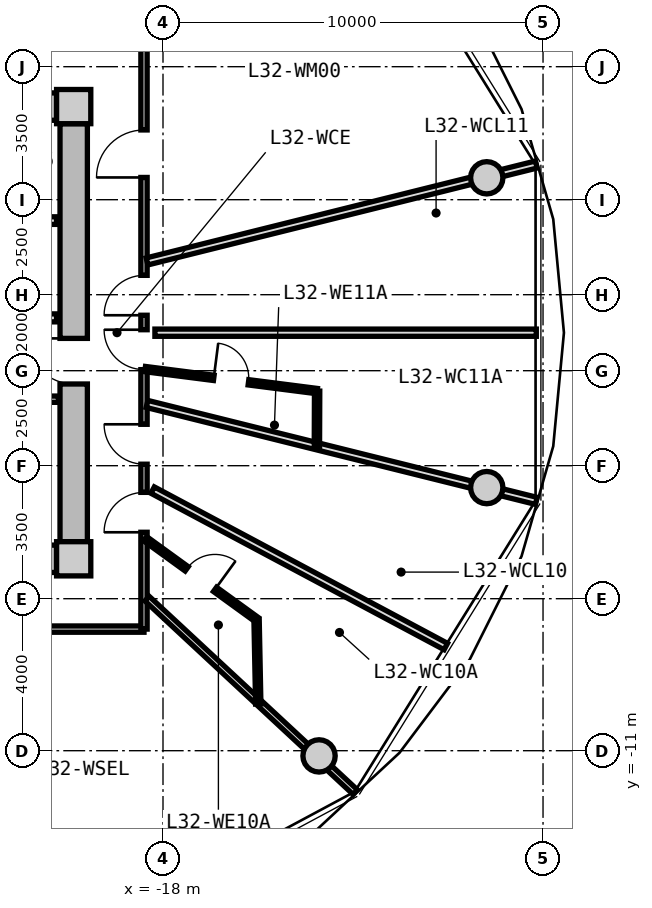
"""IFC4 building model, lengths in metres.
Left out: names, types, materials, properties, quantities, classifications, styles, units other than length and angle.
Written with IfcOpenShell. Run it as: python <this file> out.ifc"""

import sys

from ifc_helpers import new_model, si_unit, direction, frame, frame_2d, origin, origin_2d, place, context, subcontext, project, spatial, rectangle, circle, extrude, source, transform, mapped, element, fill, save


model = new_model("IFC4")
c1 = context("Model", 3, precision=1e-05, world=origin(), true_north=direction((0.0, 1.0)))
c2 = subcontext(c1, "Body", "Model", "MODEL_VIEW")
j1 = project(units=[si_unit("LENGTHUNIT", "METRE"), si_unit("PLANEANGLEUNIT", "RADIAN")], contexts=[c1])
p1 = place(None, origin())
s1 = spatial("IfcSite", under=j1, at=p1, CompositionType="ELEMENT")
p2 = place(p1, origin())
s2 = spatial("IfcBuilding", under=s1, at=p2, CompositionType="ELEMENT")
p3 = place(p2, frame((0.0, 0.0, 105.4)))
s3 = spatial("IfcBuildingStorey", under=s2, at=p3, CompositionType="ELEMENT", Elevation=105.4)
m1 = source(origin(), c2, "Body", "SweptSolid", [
    extrude(rectangle(XDim=0.9, YDim=0.9, at=origin_2d()), origin(), (0.0, 0.0, 1.0), 3.05),
])
for number, where, z_axis, x_axis in (
    (1, (-20.35, -5.95, 0.0), (0.0, 0.0, 1.0), (1.0, 0.0, 0.0)),
    (2, (-20.35, 5.95, 0.0), (0.0, 0.0, 1.0), (1.0, 0.0, 0.0)),
):
    element("IfcColumn", number, at=place(p3, frame(where, z_axis=z_axis, x_axis=x_axis)), inside=s3, PredefinedType="COLUMN", context=c2, shape_type="MappedRepresentation", body=[
        mapped(m1, transform((0.0, 0.0, 0.0), x_axis=(1.0, 0.0, 0.0), y_axis=(0.0, 1.0, 0.0), z_axis=(0.0, 0.0, 1.0), scale=1.0)),
    ])
m2 = source(origin(), c2, "Body", "SweptSolid", [
    extrude(rectangle(XDim=14.4, YDim=0.72, at=frame_2d((7.2, 0.0))), origin(), (0.0, 0.0, 1.0), 2.79),
])
for number, where, z_axis, x_axis in (
    (3, (-35.2, 5.95, 0.0), (0.0, 0.0, 1.0), (1.0, 0.0, 0.0)),
    (4, (-20.8, -5.95, 0.0), (0.0, 0.0, 1.0), (-1.0, 0.0, 0.0)),
):
    element("IfcWall", number, at=place(p3, frame(where, z_axis=z_axis, x_axis=x_axis)), inside=s3, PredefinedType="SHEAR", context=c2, shape_type="MappedRepresentation", body=[
        mapped(m2, transform((0.0, 0.0, 0.0), x_axis=(1.0, 0.0, 0.0), y_axis=(0.0, 1.0, 0.0), z_axis=(0.0, 0.0, 1.0), scale=1.0)),
    ])
m3 = source(origin(), c2, "Body", "SweptSolid", [
    extrude(rectangle(XDim=11.0, YDim=0.72, at=frame_2d((5.5, 0.0))), origin(), (0.0, 0.0, 1.0), 2.79),
])
p4 = place(p3, frame((-20.35, 5.5, 0.0), z_axis=(0.0, 0.0, 1.0), x_axis=(0.0, -1.0, 0.0)))
e5 = element("IfcWall", 5, at=p4, inside=s3, PredefinedType="SHEAR", context=c2, shape_type="MappedRepresentation", body=[
    mapped(m3, transform((0.0, 0.0, 0.0), x_axis=(1.0, 0.0, 0.0), y_axis=(0.0, 1.0, 0.0), z_axis=(0.0, 0.0, 1.0), scale=1.0)),
])
p5 = place(p4, frame((5.65, 0.0, 0.0)))
e6 = element("IfcOpeningElement", 6, at=p5, cuts=e5, PredefinedType="OPENING", context=c2, shape_type="SweptSolid", body=[
    extrude(rectangle(XDim=1.2, YDim=2.15, at=frame_2d((0.6, 1.075))), frame((0.0, 0.37, 0.0), z_axis=(0.0, -1.0, 0.0), x_axis=(1.0, 0.0, 0.0)), (0.0, 0.0, 1.0), 0.74),
])
m4 = source(origin(), c2, "Body", "SweptSolid", [
    extrude(circle(Radius=0.425, at=origin_2d()), origin(), (0.0, 0.0, 1.0), 3.05),
])
for number, where, z_axis, x_axis in (
    (7, (-9.481, 4.076, 0.0), (0.0, 0.0, 1.0), (1.0, 0.0, 0.0)),
    (8, (-13.894, -11.137, 0.0), (0.0, 0.0, 1.0), (1.0, 0.0, 0.0)),
    (9, (-9.481, -4.076, 0.0), (0.0, 0.0, 1.0), (1.0, 0.0, 0.0)),
):
    element("IfcColumn", number, at=place(p3, frame(where, z_axis=z_axis, x_axis=x_axis)), inside=s3, PredefinedType="COLUMN", context=c2, shape_type="MappedRepresentation", body=[
        mapped(m4, transform((0.0, 0.0, 0.0), x_axis=(1.0, 0.0, 0.0), y_axis=(0.0, 1.0, 0.0), z_axis=(0.0, 0.0, 1.0), scale=1.0)),
    ])
m5 = source(origin(), c2, "Body", "SweptSolid", [
    extrude(rectangle(XDim=3.2, YDim=0.2, at=frame_2d((1.6, 0.0))), origin(), (0.0, 0.0, 1.0), 2.775),
])
p6 = place(p3, frame((-24.0, 2.95, 0.0), z_axis=(0.0, 0.0, 1.0), x_axis=(1.0, 0.0, 0.0)))
e10 = element("IfcWall", 10, at=p6, inside=s3, PredefinedType="PARTITIONING", context=c2, shape_type="MappedRepresentation", body=[
    mapped(m5, transform((0.0, 0.0, 0.0), x_axis=(1.0, 0.0, 0.0), y_axis=(0.0, 1.0, 0.0), z_axis=(0.0, 0.0, 1.0), scale=1.0)),
])
m6 = source(origin(), c2, "Body", "SweptSolid", [
    extrude(rectangle(XDim=6.66, YDim=0.21, at=frame_2d((3.33, 0.0))), origin(), (0.0, 0.0, 1.0), 2.775),
])
p7 = place(p3, frame((-27.46, 0.39, 0.0), z_axis=(0.0, 0.0, 1.0), x_axis=(1.0, 0.0, 0.0)))
e11 = element("IfcWall", 11, at=p7, inside=s3, PredefinedType="PARTITIONING", context=c2, shape_type="MappedRepresentation", body=[
    mapped(m6, transform((0.0, 0.0, 0.0), x_axis=(1.0, 0.0, 0.0), y_axis=(0.0, 1.0, 0.0), z_axis=(0.0, 0.0, 1.0), scale=1.0)),
])
p8 = place(p7, frame((1.0, 0.0, 0.0)))
e12 = element("IfcOpeningElement", 12, at=p8, cuts=e11, PredefinedType="OPENING", context=c2, shape_type="SweptSolid", body=[
    extrude(rectangle(XDim=1.2, YDim=2.15, at=frame_2d((0.6, 1.075))), frame((0.0, 0.115, 0.0), z_axis=(0.0, -1.0, 0.0), x_axis=(1.0, 0.0, 0.0)), (0.0, 0.0, 1.0), 0.23),
])
m7 = source(origin(), c2, "Body", "SweptSolid", [
    extrude(rectangle(XDim=2.7, YDim=0.165, at=frame_2d((1.35, 0.0))), origin(), (0.0, 0.0, 1.0), 2.775),
])
p9 = place(p3, frame((-23.45, -1.75, 0.0), z_axis=(0.0, 0.0, 1.0), x_axis=(1.0, 0.0, 0.0)))
e13 = element("IfcWall", 13, at=p9, inside=s3, PredefinedType="PARTITIONING", context=c2, shape_type="MappedRepresentation", body=[
    mapped(m7, transform((0.0, 0.0, 0.0), x_axis=(1.0, 0.0, 0.0), y_axis=(0.0, 1.0, 0.0), z_axis=(0.0, 0.0, 1.0), scale=1.0)),
])
p10 = place(p9, frame((0.222, 0.0, 0.0)))
e14 = element("IfcOpeningElement", 14, at=p10, cuts=e13, PredefinedType="OPENING", context=c2, shape_type="SweptSolid", body=[
    extrude(rectangle(XDim=0.925, YDim=2.1, at=frame_2d((0.462, 1.05))), frame((0.0, 0.093, 0.0), z_axis=(0.0, -1.0, 0.0), x_axis=(1.0, 0.0, 0.0)), (0.0, 0.0, 1.0), 0.185),
])
p11 = place(p9, frame((1.522, 0.0, 0.0)))
e15 = element("IfcOpeningElement", 15, at=p11, cuts=e13, PredefinedType="OPENING", context=c2, shape_type="SweptSolid", body=[
    extrude(rectangle(XDim=0.925, YDim=2.1, at=frame_2d((0.462, 1.05))), frame((0.0, 0.093, 0.0), z_axis=(0.0, -1.0, 0.0), x_axis=(1.0, 0.0, 0.0)), (0.0, 0.0, 1.0), 0.185),
])
m8 = source(origin(), c2, "Body", "SweptSolid", [
    extrude(rectangle(XDim=8.6, YDim=0.165, at=frame_2d((4.3, 0.0))), origin(), (0.0, 0.0, 1.0), 2.775),
])
p12 = place(p3, frame((-18.5, -7.8, 0.0), z_axis=(0.0, 0.0, 1.0), x_axis=(-1.0, 0.0, 0.0)))
e16 = element("IfcWall", 16, at=p12, inside=s3, PredefinedType="PARTITIONING", context=c2, shape_type="MappedRepresentation", body=[
    mapped(m8, transform((0.0, 0.0, 0.0), x_axis=(1.0, 0.0, 0.0), y_axis=(0.0, 1.0, 0.0), z_axis=(0.0, 0.0, 1.0), scale=1.0)),
])
p13 = place(p12, frame((3.775, 0.0, 0.0)))
e17 = element("IfcOpeningElement", 17, at=p13, cuts=e16, PredefinedType="OPENING", context=c2, shape_type="SweptSolid", body=[
    extrude(rectangle(XDim=1.05, YDim=2.15, at=frame_2d((0.525, 1.075))), frame((0.0, 0.093, 0.0), z_axis=(0.0, -1.0, 0.0), x_axis=(1.0, 0.0, 0.0)), (0.0, 0.0, 1.0), 0.185),
])
m9 = source(origin(), c2, "Body", "SweptSolid", [
    extrude(rectangle(XDim=15.6, YDim=0.165, at=frame_2d((7.8, 0.0))), origin(), (0.0, 0.0, 1.0), 2.775),
])
p14 = place(p3, frame((-18.5, 7.8, 0.0), z_axis=(0.0, 0.0, 1.0), x_axis=(0.0, -1.0, 0.0)))
e18 = element("IfcWall", 18, at=p14, inside=s3, PredefinedType="PARTITIONING", context=c2, shape_type="MappedRepresentation", body=[
    mapped(m9, transform((0.0, 0.0, 0.0), x_axis=(1.0, 0.0, 0.0), y_axis=(0.0, 1.0, 0.0), z_axis=(0.0, 0.0, 1.0), scale=1.0)),
])
p15 = place(p14, frame((12.002, 0.0, 0.0)))
e19 = element("IfcOpeningElement", 19, at=p15, cuts=e18, PredefinedType="OPENING", context=c2, shape_type="SweptSolid", body=[
    extrude(rectangle(XDim=1.05, YDim=2.15, at=frame_2d((0.525, 1.075))), frame((0.0, 0.093, 0.0), z_axis=(0.0, -1.0, 0.0), x_axis=(1.0, 0.0, 0.0)), (0.0, 0.0, 1.0), 0.185),
])
p16 = place(p14, frame((10.211, 0.0, 0.0)))
e20 = element("IfcOpeningElement", 20, at=p16, cuts=e18, PredefinedType="OPENING", context=c2, shape_type="SweptSolid", body=[
    extrude(rectangle(XDim=1.05, YDim=2.15, at=frame_2d((0.525, 1.075))), frame((0.0, 0.093, 0.0), z_axis=(0.0, -1.0, 0.0), x_axis=(1.0, 0.0, 0.0)), (0.0, 0.0, 1.0), 0.185),
])
p17 = place(p14, frame((7.722, 0.0, 0.0)))
e21 = element("IfcOpeningElement", 21, at=p17, cuts=e18, PredefinedType="OPENING", context=c2, shape_type="SweptSolid", body=[
    extrude(rectangle(XDim=1.05, YDim=2.15, at=frame_2d((0.525, 1.075))), frame((0.0, 0.093, 0.0), z_axis=(0.0, -1.0, 0.0), x_axis=(1.0, 0.0, 0.0)), (0.0, 0.0, 1.0), 0.185),
])
p18 = place(p14, frame((6.291, 0.0, 0.0)))
e22 = element("IfcOpeningElement", 22, at=p18, cuts=e18, PredefinedType="OPENING", context=c2, shape_type="SweptSolid", body=[
    extrude(rectangle(XDim=1.05, YDim=2.15, at=frame_2d((0.525, 1.075))), frame((0.0, 0.093, 0.0), z_axis=(0.0, -1.0, 0.0), x_axis=(1.0, 0.0, 0.0)), (0.0, 0.0, 1.0), 0.185),
])
p19 = place(p14, frame((2.465, 0.0, 0.0)))
e23 = element("IfcOpeningElement", 23, at=p19, cuts=e18, PredefinedType="OPENING", context=c2, shape_type="SweptSolid", body=[
    extrude(rectangle(XDim=1.25, YDim=2.2, at=frame_2d((0.625, 1.1))), frame((0.0, 0.093, 0.0), z_axis=(0.0, -1.0, 0.0), x_axis=(1.0, 0.0, 0.0)), (0.0, 0.0, 1.0), 0.185),
])
m10 = source(origin(), c2, "Body", "SweptSolid", [
    extrude(rectangle(XDim=7.482, YDim=0.165, at=frame_2d((3.741, 0.0))), origin(), (0.0, 0.0, 1.0), 2.275),
])
p20 = place(p3, frame((-18.42, -6.998, 0.0), z_axis=(0.0, 0.0, 1.0), x_axis=(0.732508698043, -0.680757671489, 0.0)))
e24 = element("IfcWall", 24, at=p20, inside=s3, PredefinedType="PARTITIONING", context=c2, shape_type="MappedRepresentation", body=[
    mapped(m10, transform((0.0, 0.0, 0.0), x_axis=(1.0, 0.0, 0.0), y_axis=(0.0, 1.0, 0.0), z_axis=(0.0, 0.0, 1.0), scale=1.0)),
])
m11 = source(origin(), c2, "Body", "SweptSolid", [
    extrude(rectangle(XDim=10.556, YDim=0.19, at=frame_2d((5.278, 0.0))), origin(), (0.0, 0.0, 1.0), 2.275),
])
p21 = place(p3, frame((-18.42, -1.875, 0.0), z_axis=(0.0, 0.0, 1.0), x_axis=(0.970363857851, -0.241648470667, 0.0)))
e25 = element("IfcWall", 25, at=p21, inside=s3, PredefinedType="PARTITIONING", context=c2, shape_type="MappedRepresentation", body=[
    mapped(m11, transform((0.0, 0.0, 0.0), x_axis=(1.0, 0.0, 0.0), y_axis=(0.0, 1.0, 0.0), z_axis=(0.0, 0.0, 1.0), scale=1.0)),
])
m12 = source(origin(), c2, "Body", "SweptSolid", [
    extrude(rectangle(XDim=8.744, YDim=0.19, at=frame_2d((4.372, 0.0))), origin(), (0.0, 0.0, 1.0), 2.775),
])
p22 = place(p3, frame((-18.273, -4.142, 0.0), z_axis=(0.0, 0.0, 1.0), x_axis=(0.882252449936, -0.470776607938, 0.0)))
e26 = element("IfcWall", 26, at=p22, inside=s3, PredefinedType="PARTITIONING", context=c2, shape_type="MappedRepresentation", body=[
    mapped(m12, transform((0.0, 0.0, 0.0), x_axis=(1.0, 0.0, 0.0), y_axis=(0.0, 1.0, 0.0), z_axis=(0.0, 0.0, 1.0), scale=1.0)),
])
m13 = source(origin(), c2, "Body", "SweptSolid", [
    extrude(rectangle(XDim=3.621, YDim=0.14, at=frame_2d((1.811, 0.0))), origin(), (0.0, 0.0, 1.0), 2.775),
])
p23 = place(p3, frame((-18.47, -5.422, 0.0), z_axis=(0.0, 0.0, 1.0), x_axis=(0.80968252222, -0.586868139544, 0.0)))
e27 = element("IfcWall", 27, at=p23, inside=s3, PredefinedType="PARTITIONING", context=c2, shape_type="MappedRepresentation", body=[
    mapped(m13, transform((0.0, 0.0, 0.0), x_axis=(1.0, 0.0, 0.0), y_axis=(0.0, 1.0, 0.0), z_axis=(0.0, 0.0, 1.0), scale=1.0)),
])
p24 = place(p23, frame((1.351, 0.0, 0.0)))
e28 = element("IfcOpeningElement", 28, at=p24, cuts=e27, PredefinedType="OPENING", context=c2, shape_type="SweptSolid", body=[
    extrude(rectangle(XDim=0.92, YDim=2.1, at=frame_2d((0.46, 1.05))), frame((0.0, 0.08, 0.0), z_axis=(0.0, -1.0, 0.0), x_axis=(1.0, 0.0, 0.0)), (0.0, 0.0, 1.0), 0.16),
])
m14 = source(origin(), c2, "Body", "SweptSolid", [
    extrude(rectangle(XDim=2.225, YDim=0.14, at=frame_2d((1.112, 0.0))), origin(), (0.0, 0.0, 1.0), 2.775),
])
p25 = place(p3, frame((-15.538, -7.547, 0.0), z_axis=(0.0, 0.0, 1.0), x_axis=(0.019971869027, -0.999800542332, 0.0)))
e29 = element("IfcWall", 29, at=p25, inside=s3, PredefinedType="PARTITIONING", context=c2, shape_type="MappedRepresentation", body=[
    mapped(m14, transform((0.0, 0.0, 0.0), x_axis=(1.0, 0.0, 0.0), y_axis=(0.0, 1.0, 0.0), z_axis=(0.0, 0.0, 1.0), scale=1.0)),
])
p26 = place(p3, frame((-18.42, 1.875, 0.0), z_axis=(0.0, 0.0, 1.0), x_axis=(0.970363857851, 0.241648470667, 0.0)))
e30 = element("IfcWall", 30, at=p26, inside=s3, PredefinedType="PARTITIONING", context=c2, shape_type="MappedRepresentation", body=[
    mapped(m11, transform((0.0, 0.0, 0.0), x_axis=(1.0, 0.0, 0.0), y_axis=(0.0, 1.0, 0.0), z_axis=(0.0, 0.0, 1.0), scale=1.0)),
])
m15 = source(origin(), c2, "Body", "SweptSolid", [
    extrude(rectangle(XDim=10.036, YDim=0.19, at=frame_2d((5.018, 0.0))), origin(), (0.0, 0.0, 1.0), 2.775),
])
p27 = place(p3, frame((-18.213, 0.0, 0.0), z_axis=(0.0, 0.0, 1.0), x_axis=(1.0, 0.0, 0.0)))
e31 = element("IfcWall", 31, at=p27, inside=s3, PredefinedType="PARTITIONING", context=c2, shape_type="MappedRepresentation", body=[
    mapped(m15, transform((0.0, 0.0, 0.0), x_axis=(1.0, 0.0, 0.0), y_axis=(0.0, 1.0, 0.0), z_axis=(0.0, 0.0, 1.0), scale=1.0)),
])
m16 = source(origin(), c2, "Body", "SweptSolid", [
    extrude(rectangle(XDim=4.562, YDim=0.14, at=frame_2d((2.281, 0.0))), origin(), (0.0, 0.0, 1.0), 2.775),
])
p28 = place(p3, frame((-18.47, -0.958, 0.0), z_axis=(0.0, 0.0, 1.0), x_axis=(0.991904666356, -0.126984774129, 0.0)))
e32 = element("IfcWall", 32, at=p28, inside=s3, PredefinedType="PARTITIONING", context=c2, shape_type="MappedRepresentation", body=[
    mapped(m16, transform((0.0, 0.0, 0.0), x_axis=(1.0, 0.0, 0.0), y_axis=(0.0, 1.0, 0.0), z_axis=(0.0, 0.0, 1.0), scale=1.0)),
])
p29 = place(p28, frame((1.821, 0.0, 0.0)))
e33 = element("IfcOpeningElement", 33, at=p29, cuts=e32, PredefinedType="OPENING", context=c2, shape_type="SweptSolid", body=[
    extrude(rectangle(XDim=0.92, YDim=2.1, at=frame_2d((0.46, 1.05))), frame((0.0, 0.08, 0.0), z_axis=(0.0, -1.0, 0.0), x_axis=(1.0, 0.0, 0.0)), (0.0, 0.0, 1.0), 0.16),
])
m17 = source(origin(), c2, "Body", "SweptSolid", [
    extrude(rectangle(XDim=1.468, YDim=0.14, at=frame_2d((0.734, 0.0))), origin(), (0.0, 0.0, 1.0), 2.775),
])
p30 = place(p3, frame((-13.945, -1.537, 0.0), z_axis=(0.0, 0.0, 1.0), x_axis=(-0.00399198416, -0.999992031999, 0.0)))
e34 = element("IfcWall", 34, at=p30, inside=s3, PredefinedType="PARTITIONING", context=c2, shape_type="MappedRepresentation", body=[
    mapped(m17, transform((0.0, 0.0, 0.0), x_axis=(1.0, 0.0, 0.0), y_axis=(0.0, 1.0, 0.0), z_axis=(0.0, 0.0, 1.0), scale=1.0)),
])
m18 = source(origin(), c2, "Body", "SweptSolid", [
    extrude(rectangle(XDim=1.2, YDim=2.15, at=frame_2d((0.6, 1.075))), frame((0.0, 0.025, 0.0), z_axis=(0.0, -1.0, 0.0), x_axis=(1.0, 0.0, 0.0)), (0.0, 0.0, 1.0), 0.05),
])
p31 = place(p5, frame((1.2, 0.0, 0.0), z_axis=(0.0, 0.0, 1.0), x_axis=(-1.0, 0.0, 0.0)))
e35 = element("IfcDoor", 35, at=p31, inside=s3, OperationType="SINGLE_SWING_RIGHT", PredefinedType="DOOR", context=c2, shape_type="MappedRepresentation", body=[
    mapped(m18, transform((0.0, 0.0, 0.0), x_axis=(1.0, 0.0, 0.0), y_axis=(0.0, 1.0, 0.0), z_axis=(0.0, 0.0, 1.0), scale=1.0)),
])
fill(e6, e35)
m19 = source(origin(), c2, "Body", "SweptSolid", [
    extrude(rectangle(XDim=1.05, YDim=2.15, at=frame_2d((0.525, 1.075))), frame((0.0, 0.025, 0.0), z_axis=(0.0, -1.0, 0.0), x_axis=(1.0, 0.0, 0.0)), (0.0, 0.0, 1.0), 0.05),
])
p32 = place(p15, frame((1.05, 0.0, 0.0), z_axis=(0.0, 0.0, 1.0), x_axis=(-1.0, 0.0, 0.0)))
e36 = element("IfcDoor", 36, at=p32, inside=s3, OperationType="SINGLE_SWING_LEFT", PredefinedType="DOOR", context=c2, shape_type="MappedRepresentation", body=[
    mapped(m19, transform((0.0, 0.0, 0.0), x_axis=(1.0, 0.0, 0.0), y_axis=(0.0, 1.0, 0.0), z_axis=(0.0, 0.0, 1.0), scale=1.0)),
])
fill(e19, e36)
m20 = source(origin(), c2, "Body", "SweptSolid", [
    extrude(rectangle(XDim=0.92, YDim=2.1, at=frame_2d((0.46, 1.05))), frame((0.0, 0.025, 0.0), z_axis=(0.0, -1.0, 0.0), x_axis=(1.0, 0.0, 0.0)), (0.0, 0.0, 1.0), 0.05),
])
p33 = place(p24, origin())
e37 = element("IfcDoor", 37, at=p33, inside=s3, OperationType="SINGLE_SWING_RIGHT", PredefinedType="DOOR", context=c2, shape_type="MappedRepresentation", body=[
    mapped(m20, transform((0.0, 0.0, 0.0), x_axis=(1.0, 0.0, 0.0), y_axis=(0.0, 1.0, 0.0), z_axis=(0.0, 0.0, 1.0), scale=1.0)),
])
fill(e28, e37)
p34 = place(p16, frame((1.05, 0.0, 0.0), z_axis=(0.0, 0.0, 1.0), x_axis=(-1.0, 0.0, 0.0)))
e38 = element("IfcDoor", 38, at=p34, inside=s3, OperationType="SINGLE_SWING_RIGHT", PredefinedType="DOOR", context=c2, shape_type="MappedRepresentation", body=[
    mapped(m19, transform((0.0, 0.0, 0.0), x_axis=(1.0, 0.0, 0.0), y_axis=(0.0, 1.0, 0.0), z_axis=(0.0, 0.0, 1.0), scale=1.0)),
])
fill(e20, e38)
p35 = place(p17, frame((1.05, 0.0, 0.0), z_axis=(0.0, 0.0, 1.0), x_axis=(-1.0, 0.0, 0.0)))
e39 = element("IfcDoor", 39, at=p35, inside=s3, OperationType="SINGLE_SWING_RIGHT", PredefinedType="DOOR", context=c2, shape_type="MappedRepresentation", body=[
    mapped(m19, transform((0.0, 0.0, 0.0), x_axis=(1.0, 0.0, 0.0), y_axis=(0.0, 1.0, 0.0), z_axis=(0.0, 0.0, 1.0), scale=1.0)),
])
fill(e21, e39)
p36 = place(p29, origin())
e40 = element("IfcDoor", 40, at=p36, inside=s3, OperationType="SINGLE_SWING_LEFT", PredefinedType="DOOR", context=c2, shape_type="MappedRepresentation", body=[
    mapped(m20, transform((0.0, 0.0, 0.0), x_axis=(1.0, 0.0, 0.0), y_axis=(0.0, 1.0, 0.0), z_axis=(0.0, 0.0, 1.0), scale=1.0)),
])
fill(e33, e40)
p37 = place(p18, frame((1.05, 0.0, 0.0), z_axis=(0.0, 0.0, 1.0), x_axis=(-1.0, 0.0, 0.0)))
e41 = element("IfcDoor", 41, at=p37, inside=s3, OperationType="SINGLE_SWING_LEFT", PredefinedType="DOOR", context=c2, shape_type="MappedRepresentation", body=[
    mapped(m19, transform((0.0, 0.0, 0.0), x_axis=(1.0, 0.0, 0.0), y_axis=(0.0, 1.0, 0.0), z_axis=(0.0, 0.0, 1.0), scale=1.0)),
])
fill(e22, e41)
m21 = source(origin(), c2, "Body", "SweptSolid", [
    extrude(rectangle(XDim=1.25, YDim=2.2, at=frame_2d((0.625, 1.1))), frame((0.0, 0.025, 0.0), z_axis=(0.0, -1.0, 0.0), x_axis=(1.0, 0.0, 0.0)), (0.0, 0.0, 1.0), 0.05),
])
p38 = place(p19, frame((1.25, 0.0, 0.0), z_axis=(0.0, 0.0, 1.0), x_axis=(-1.0, 0.0, 0.0)))
e42 = element("IfcDoor", 42, at=p38, inside=s3, OperationType="SINGLE_SWING_LEFT", PredefinedType="DOOR", context=c2, shape_type="MappedRepresentation", body=[
    mapped(m21, transform((0.0, 0.0, 0.0), x_axis=(1.0, 0.0, 0.0), y_axis=(0.0, 1.0, 0.0), z_axis=(0.0, 0.0, 1.0), scale=1.0)),
])
fill(e23, e42)
save(model, sys.argv[1])
